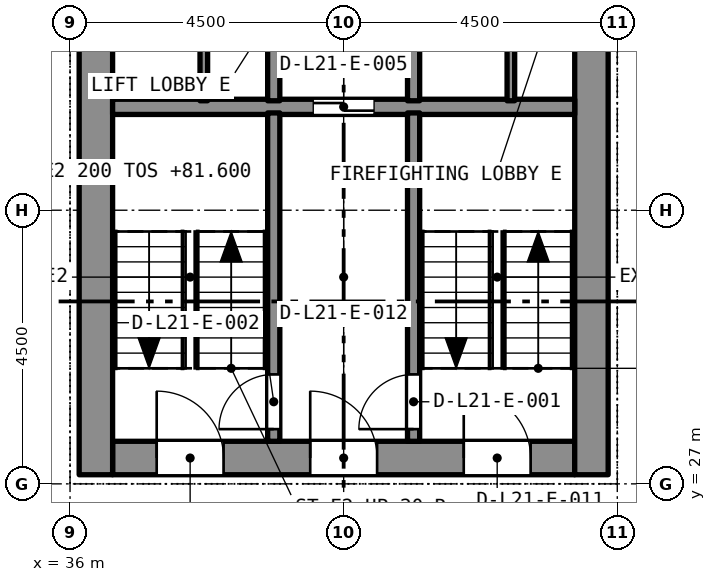
"""IFC4 building model, lengths in metres.
Left out: names, types, materials, properties, quantities, classifications, styles, units other than length and angle.
Written with IfcOpenShell. Run it as: python <this file> out.ifc"""

import sys

from ifc_helpers import new_model, si_unit, direction, frame, frame_2d, origin, place, context, subcontext, project, spatial, rectangle, extrude, element, fill, save


model = new_model("IFC4")
c1 = context("Model", 3, precision=1e-05, world=origin(), true_north=direction((0.0, 1.0)))
c2 = subcontext(c1, "Body", "Model", "MODEL_VIEW")
j1 = project(units=[si_unit("LENGTHUNIT", "METRE"), si_unit("PLANEANGLEUNIT", "RADIAN")], contexts=[c1])
p1 = place(None, origin())
s1 = spatial("IfcSite", under=j1, at=p1, CompositionType="ELEMENT")
p2 = place(p1, origin())
s2 = spatial("IfcBuilding", under=s1, at=p2, CompositionType="ELEMENT")
p3 = place(p2, frame((0.0, 0.0, 80.0)))
s3 = spatial("IfcBuildingStorey", under=s2, at=p3, CompositionType="ELEMENT", Elevation=80.0)
p4 = place(p3, frame((36.7, 27.425, 0.0), z_axis=(0.0, 0.0, 1.0), x_axis=(1.0, 0.0, 0.0)))
e1 = element("IfcWall", 1, at=p4, inside=s3, PredefinedType="SOLIDWALL", context=c2, shape_type="SweptSolid", body=[
    extrude(rectangle(XDim=7.6, YDim=0.55, at=frame_2d((3.8, 0.0))), origin(), (0.0, 0.0, 1.0), 3.2),
])
p5 = place(p4, frame((5.775, 0.0, 0.0)))
e2 = element("IfcOpeningElement", 2, at=p5, cuts=e1, PredefinedType="OPENING", context=c2, shape_type="SweptSolid", body=[
    extrude(rectangle(XDim=1.1, YDim=2.1, at=frame_2d((0.55, 1.05))), frame((0.0, 0.285, 0.0), z_axis=(0.0, -1.0, 0.0), x_axis=(1.0, 0.0, 0.0)), (0.0, 0.0, 1.0), 0.57),
])
p6 = place(p4, frame((3.25, 0.0, 0.0)))
e3 = element("IfcOpeningElement", 3, at=p6, cuts=e1, PredefinedType="OPENING", context=c2, shape_type="SweptSolid", body=[
    extrude(rectangle(XDim=1.1, YDim=2.1, at=frame_2d((0.55, 1.05))), frame((0.0, 0.285, 0.0), z_axis=(0.0, -1.0, 0.0), x_axis=(1.0, 0.0, 0.0)), (0.0, 0.0, 1.0), 0.57),
])
p7 = place(p4, frame((0.725, 0.0, 0.0)))
e4 = element("IfcOpeningElement", 4, at=p7, cuts=e1, PredefinedType="OPENING", context=c2, shape_type="SweptSolid", body=[
    extrude(rectangle(XDim=1.1, YDim=2.1, at=frame_2d((0.55, 1.05))), frame((0.0, 0.285, 0.0), z_axis=(0.0, -1.0, 0.0), x_axis=(1.0, 0.0, 0.0)), (0.0, 0.0, 1.0), 0.57),
])
p8 = place(p3, frame((36.425, 27.15, 0.0), z_axis=(0.0, 0.0, 1.0), x_axis=(0.0, 1.0, 0.0)))
e5 = element("IfcWall", 5, at=p8, inside=s3, PredefinedType="SOLIDWALL", context=c2, shape_type="SweptSolid", body=[
    extrude(rectangle(XDim=13.2, YDim=0.55, at=frame_2d((6.6, 0.0))), origin(), (0.0, 0.0, 1.0), 3.2),
])
p9 = place(p8, frame((8.8, 0.0, 0.0)))
e6 = element("IfcOpeningElement", 6, at=p9, cuts=e5, PredefinedType="OPENING", context=c2, shape_type="SweptSolid", body=[
    extrude(rectangle(XDim=1.2, YDim=2.1, at=frame_2d((0.6, 1.05))), frame((0.0, 0.285, 0.0), z_axis=(0.0, -1.0, 0.0), x_axis=(1.0, 0.0, 0.0)), (0.0, 0.0, 1.0), 0.57),
])
p10 = place(p3, frame((44.575, 27.15, 0.0), z_axis=(0.0, 0.0, 1.0), x_axis=(0.0, 1.0, 0.0)))
e7 = element("IfcWall", 7, at=p10, inside=s3, PredefinedType="SOLIDWALL", context=c2, shape_type="SweptSolid", body=[
    extrude(rectangle(XDim=13.2, YDim=0.55, at=frame_2d((6.6, 0.0))), origin(), (0.0, 0.0, 1.0), 3.2),
])
p11 = place(p10, frame((8.8, 0.0, 0.0)))
e8 = element("IfcOpeningElement", 8, at=p11, cuts=e7, PredefinedType="OPENING", context=c2, shape_type="SweptSolid", body=[
    extrude(rectangle(XDim=1.2, YDim=2.1, at=frame_2d((0.6, 1.05))), frame((0.0, 0.285, 0.0), z_axis=(0.0, -1.0, 0.0), x_axis=(1.0, 0.0, 0.0)), (0.0, 0.0, 1.0), 0.57),
])
p12 = place(p3, frame((36.7, 33.2, 0.0), z_axis=(0.0, 0.0, 1.0), x_axis=(1.0, 0.0, 0.0)))
e9 = element("IfcWall", 9, at=p12, inside=s3, PredefinedType="SOLIDWALL", context=c2, shape_type="SweptSolid", body=[
    extrude(rectangle(XDim=7.6, YDim=0.25, at=frame_2d((3.8, 0.0))), origin(), (0.0, 0.0, 1.0), 2.9),
])
p13 = place(p12, frame((3.3, 0.0, 0.0)))
e10 = element("IfcOpeningElement", 10, at=p13, cuts=e9, PredefinedType="OPENING", context=c2, shape_type="SweptSolid", body=[
    extrude(rectangle(XDim=1.0, YDim=2.1, at=frame_2d((0.5, 1.05))), frame((0.0, 0.135, 0.0), z_axis=(0.0, -1.0, 0.0), x_axis=(1.0, 0.0, 0.0)), (0.0, 0.0, 1.0), 0.27),
])
p14 = place(p3, frame((41.65, 27.7, 0.0), z_axis=(0.0, 0.0, 1.0), x_axis=(0.0, 1.0, 0.0)))
e11 = element("IfcWall", 11, at=p14, inside=s3, PredefinedType="SOLIDWALL", context=c2, shape_type="SweptSolid", body=[
    extrude(rectangle(XDim=5.4, YDim=0.2, at=frame_2d((2.7, 0.0))), origin(), (0.0, 0.0, 1.0), 2.9),
])
p15 = place(p14, frame((0.2, 0.0, 0.0)))
e12 = element("IfcOpeningElement", 12, at=p15, cuts=e11, PredefinedType="OPENING", context=c2, shape_type="SweptSolid", body=[
    extrude(rectangle(XDim=0.9, YDim=2.1, at=frame_2d((0.45, 1.05))), frame((0.0, 0.11, 0.0), z_axis=(0.0, -1.0, 0.0), x_axis=(1.0, 0.0, 0.0)), (0.0, 0.0, 1.0), 0.22),
])
p16 = place(p3, frame((39.35, 27.7, 0.0), z_axis=(0.0, 0.0, 1.0), x_axis=(0.0, 1.0, 0.0)))
e13 = element("IfcWall", 13, at=p16, inside=s3, PredefinedType="SOLIDWALL", context=c2, shape_type="SweptSolid", body=[
    extrude(rectangle(XDim=5.4, YDim=0.2, at=frame_2d((2.7, 0.0))), origin(), (0.0, 0.0, 1.0), 2.9),
])
p17 = place(p16, frame((0.2, 0.0, 0.0)))
e14 = element("IfcOpeningElement", 14, at=p17, cuts=e13, PredefinedType="OPENING", context=c2, shape_type="SweptSolid", body=[
    extrude(rectangle(XDim=0.9, YDim=2.1, at=frame_2d((0.45, 1.05))), frame((0.0, 0.11, 0.0), z_axis=(0.0, -1.0, 0.0), x_axis=(1.0, 0.0, 0.0)), (0.0, 0.0, 1.0), 0.22),
])
for number, where, z_axis, x_axis in (
    (15, (41.65, 33.3, 0.0), (0.0, 0.0, 1.0), (0.0, 1.0, 0.0)),
    (16, (39.35, 33.3, 0.0), (0.0, 0.0, 1.0), (0.0, 1.0, 0.0)),
):
    element("IfcWall", number, at=place(p3, frame(where, z_axis=z_axis, x_axis=x_axis)), inside=s3, PredefinedType="SOLIDWALL", context=c2, shape_type="SweptSolid", body=[
        extrude(rectangle(XDim=2.3, YDim=0.2, at=frame_2d((1.15, 0.0))), origin(), (0.0, 0.0, 1.0), 2.9),
    ])
for number, where, z_axis, x_axis in (
    (17, (43.25, 33.3, 0.0), (0.0, 0.0, 1.0), (0.0, 1.0, 0.0)),
    (18, (38.2, 33.3, 0.0), (0.0, 0.0, 1.0), (0.0, 1.0, 0.0)),
):
    element("IfcWall", number, at=place(p3, frame(where, z_axis=z_axis, x_axis=x_axis)), inside=s3, PredefinedType="PARTITIONING", context=c2, shape_type="SweptSolid", body=[
        extrude(rectangle(XDim=2.3, YDim=0.125, at=frame_2d((1.15, 0.0))), origin(), (0.0, 0.0, 1.0), 2.9),
    ])
p18 = place(p15, origin())
e19 = element("IfcDoor", 19, at=p18, inside=s3, OperationType="SINGLE_SWING_LEFT", PredefinedType="DOOR", context=c2, shape_type="SweptSolid", body=[
    extrude(rectangle(XDim=0.9, YDim=2.1, at=frame_2d((0.45, 1.05))), frame((0.0, 0.025, 0.0), z_axis=(0.0, -1.0, 0.0), x_axis=(1.0, 0.0, 0.0)), (0.0, 0.0, 1.0), 0.05),
])
fill(e12, e19)
p19 = place(p17, origin())
e20 = element("IfcDoor", 20, at=p19, inside=s3, OperationType="SINGLE_SWING_LEFT", PredefinedType="DOOR", context=c2, shape_type="SweptSolid", body=[
    extrude(rectangle(XDim=0.9, YDim=2.1, at=frame_2d((0.45, 1.05))), frame((0.0, 0.025, 0.0), z_axis=(0.0, -1.0, 0.0), x_axis=(1.0, 0.0, 0.0)), (0.0, 0.0, 1.0), 0.05),
])
fill(e14, e20)
p20 = place(p13, origin())
e21 = element("IfcDoor", 21, at=p20, inside=s3, OperationType="SLIDING_TO_LEFT", PredefinedType="DOOR", context=c2, shape_type="SweptSolid", body=[
    extrude(rectangle(XDim=1.0, YDim=2.1, at=frame_2d((0.5, 1.05))), frame((0.0, 0.025, 0.0), z_axis=(0.0, -1.0, 0.0), x_axis=(1.0, 0.0, 0.0)), (0.0, 0.0, 1.0), 0.05),
])
fill(e10, e21)
p21 = place(p5, origin())
e22 = element("IfcDoor", 22, at=p21, inside=s3, OperationType="SINGLE_SWING_LEFT", PredefinedType="DOOR", context=c2, shape_type="SweptSolid", body=[
    extrude(rectangle(XDim=1.1, YDim=2.1, at=frame_2d((0.55, 1.05))), frame((0.0, 0.025, 0.0), z_axis=(0.0, -1.0, 0.0), x_axis=(1.0, 0.0, 0.0)), (0.0, 0.0, 1.0), 0.05),
])
fill(e2, e22)
p22 = place(p6, origin())
e23 = element("IfcDoor", 23, at=p22, inside=s3, OperationType="SINGLE_SWING_LEFT", PredefinedType="DOOR", context=c2, shape_type="SweptSolid", body=[
    extrude(rectangle(XDim=1.1, YDim=2.1, at=frame_2d((0.55, 1.05))), frame((0.0, 0.025, 0.0), z_axis=(0.0, -1.0, 0.0), x_axis=(1.0, 0.0, 0.0)), (0.0, 0.0, 1.0), 0.05),
])
fill(e3, e23)
p23 = place(p7, origin())
e24 = element("IfcDoor", 24, at=p23, inside=s3, OperationType="SINGLE_SWING_LEFT", PredefinedType="DOOR", context=c2, shape_type="SweptSolid", body=[
    extrude(rectangle(XDim=1.1, YDim=2.1, at=frame_2d((0.55, 1.05))), frame((0.0, 0.025, 0.0), z_axis=(0.0, -1.0, 0.0), x_axis=(1.0, 0.0, 0.0)), (0.0, 0.0, 1.0), 0.05),
])
fill(e4, e24)
save(model, sys.argv[1])
